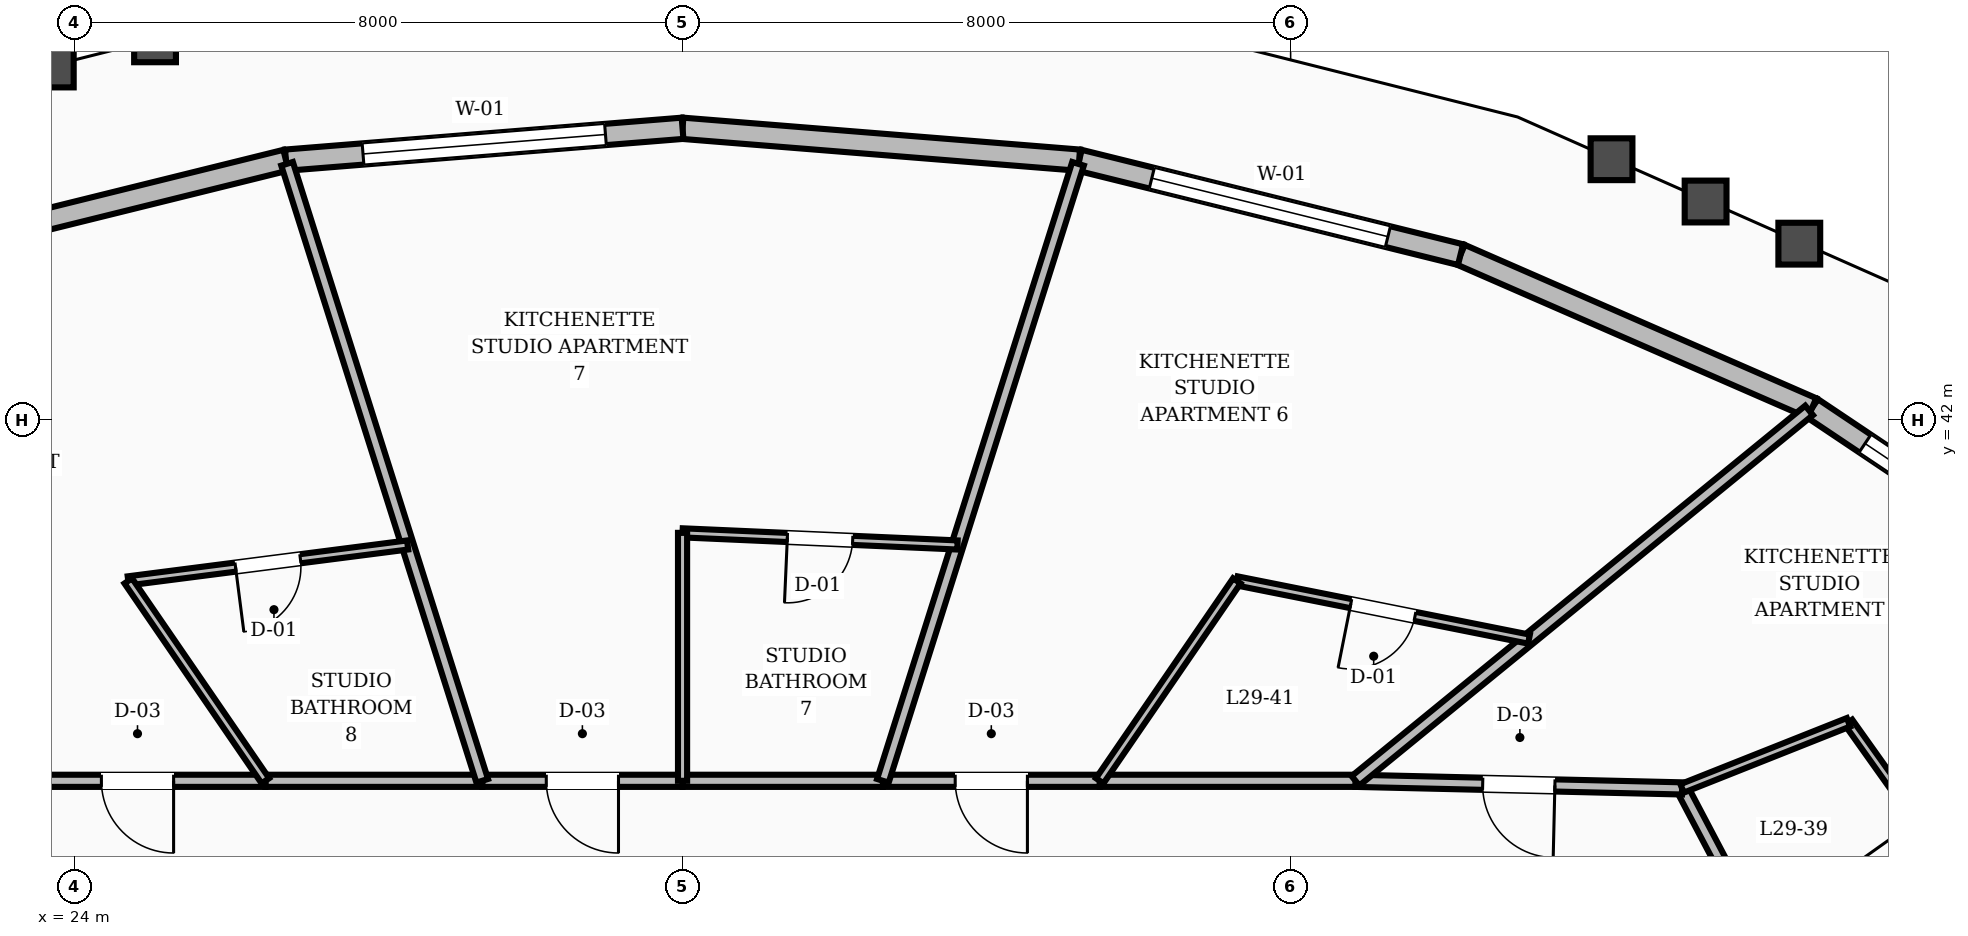
"""IFC4 building model, lengths in metres.
Left out: names, types, materials, properties, quantities, classifications, styles, units other than length and angle.
Written with IfcOpenShell. Run it as: python <this file> out.ifc"""

import sys

from ifc_helpers import new_model, si_unit, direction, frame, frame_2d, origin, place, context, subcontext, project, spatial, rectangle, extrude, element, fill, save


model = new_model("IFC4")
c1 = context("Model", 3, precision=1e-05, world=origin(), true_north=direction((0.0, 1.0)))
c2 = subcontext(c1, "Body", "Model", "MODEL_VIEW")
j1 = project(units=[si_unit("LENGTHUNIT", "METRE"), si_unit("PLANEANGLEUNIT", "RADIAN")], contexts=[c1])
p1 = place(None, origin())
s1 = spatial("IfcSite", under=j1, at=p1, CompositionType="ELEMENT")
p2 = place(p1, origin())
s2 = spatial("IfcBuilding", under=s1, at=p2, CompositionType="ELEMENT")
p3 = place(p2, frame((0.0, 0.0, 117.2)))
s3 = spatial("IfcBuildingStorey", under=s2, at=p3, CompositionType="ELEMENT", Elevation=117.2)
p4 = place(p3, frame((50.913, 39.439, 0.0), z_axis=(0.0, 0.0, 1.0), x_axis=(-0.830785482437, 0.556592743549, 0.0)))
e1 = element("IfcWall", 1, at=p4, inside=s3, PredefinedType="STANDARD", context=c2, shape_type="SweptSolid", body=[
    extrude(rectangle(XDim=4.878, YDim=0.28, at=frame_2d((2.439, 0.0))), origin(), (0.0, 0.0, 1.0), 2.82),
])
p5 = place(p4, frame((0.839, 0.0, 0.8)))
e2 = element("IfcOpeningElement", 2, at=p5, cuts=e1, PredefinedType="OPENING", context=c2, shape_type="SweptSolid", body=[
    extrude(rectangle(XDim=3.2, YDim=1.65, at=frame_2d((1.6, 0.825))), frame((0.0, 0.15, 0.0), z_axis=(0.0, -1.0, 0.0), x_axis=(1.0, 0.0, 0.0)), (0.0, 0.0, 1.0), 0.3),
])
p6 = place(p3, frame((46.86, 42.155, 0.0), z_axis=(0.0, 0.0, 1.0), x_axis=(-0.916542280899, 0.39993780432, 0.0)))
e3 = element("IfcWall", 3, at=p6, inside=s3, PredefinedType="STANDARD", context=c2, shape_type="SweptSolid", body=[
    extrude(rectangle(XDim=5.045, YDim=0.28, at=frame_2d((2.523, 0.0))), origin(), (0.0, 0.0, 1.0), 2.82),
])
p7 = place(p3, frame((42.235, 44.173, 0.0), z_axis=(0.0, 0.0, 1.0), x_axis=(-0.970681867926, 0.24036786657, 0.0)))
e4 = element("IfcWall", 4, at=p7, inside=s3, PredefinedType="STANDARD", context=c2, shape_type="SweptSolid", body=[
    extrude(rectangle(XDim=5.169, YDim=0.28, at=frame_2d((2.584, 0.0))), origin(), (0.0, 0.0, 1.0), 2.82),
])
p8 = place(p7, frame((0.985, 0.0, 0.8)))
e5 = element("IfcOpeningElement", 5, at=p8, cuts=e4, PredefinedType="OPENING", context=c2, shape_type="SweptSolid", body=[
    extrude(rectangle(XDim=3.2, YDim=1.65, at=frame_2d((1.6, 0.825))), frame((0.0, 0.15, 0.0), z_axis=(0.0, -1.0, 0.0), x_axis=(1.0, 0.0, 0.0)), (0.0, 0.0, 1.0), 0.3),
])
p9 = place(p3, frame((37.218, 45.415, 0.0), z_axis=(0.0, 0.0, 1.0), x_axis=(-0.996781229601, 0.080169696986, 0.0)))
e6 = element("IfcWall", 6, at=p9, inside=s3, PredefinedType="STANDARD", context=c2, shape_type="SweptSolid", body=[
    extrude(rectangle(XDim=5.235, YDim=0.28, at=frame_2d((2.617, 0.0))), origin(), (0.0, 0.0, 1.0), 2.82),
])
p10 = place(p3, frame((32.0, 45.835, 0.0), z_axis=(0.0, 0.0, 1.0), x_axis=(-0.996781229601, -0.080169696986, 0.0)))
e7 = element("IfcWall", 7, at=p10, inside=s3, PredefinedType="STANDARD", context=c2, shape_type="SweptSolid", body=[
    extrude(rectangle(XDim=5.235, YDim=0.28, at=frame_2d((2.617, 0.0))), origin(), (0.0, 0.0, 1.0), 2.82),
])
p11 = place(p10, frame((1.017, 0.0, 0.8)))
e8 = element("IfcOpeningElement", 8, at=p11, cuts=e7, PredefinedType="OPENING", context=c2, shape_type="SweptSolid", body=[
    extrude(rectangle(XDim=3.2, YDim=1.65, at=frame_2d((1.6, 0.825))), frame((0.0, 0.15, 0.0), z_axis=(0.0, -1.0, 0.0), x_axis=(1.0, 0.0, 0.0)), (0.0, 0.0, 1.0), 0.3),
])
p12 = place(p3, frame((26.782, 45.415, 0.0), z_axis=(0.0, 0.0, 1.0), x_axis=(-0.970681867926, -0.24036786657, 0.0)))
e9 = element("IfcWall", 9, at=p12, inside=s3, PredefinedType="STANDARD", context=c2, shape_type="SweptSolid", body=[
    extrude(rectangle(XDim=5.169, YDim=0.28, at=frame_2d((2.584, 0.0))), origin(), (0.0, 0.0, 1.0), 2.82),
])
p13 = place(p3, frame((46.85, 33.923, 0.0), z_axis=(0.0, 0.0, 1.0), x_axis=(-0.466093963429, 0.884735224378, 0.0)))
e10 = element("IfcWall", 10, at=p13, inside=s3, PredefinedType="SOLIDWALL", context=c2, shape_type="SweptSolid", body=[
    extrude(rectangle(XDim=3.648, YDim=0.16, at=frame_2d((1.824, 0.0))), origin(), (0.0, 0.0, 1.0), 2.8),
])
p14 = place(p3, frame((45.15, 37.15, 0.0), z_axis=(0.0, 0.0, 1.0), x_axis=(-0.999728709658, 0.023291781507, 0.0)))
e11 = element("IfcWall", 11, at=p14, inside=s3, PredefinedType="SOLIDWALL", context=c2, shape_type="SweptSolid", body=[
    extrude(rectangle(XDim=4.298, YDim=0.16, at=frame_2d((2.149, 0.0))), origin(), (0.0, 0.0, 1.0), 2.8),
])
p15 = place(p14, frame((1.674, 0.0, 0.0)))
e12 = element("IfcOpeningElement", 12, at=p15, cuts=e11, PredefinedType="OPENING", context=c2, shape_type="SweptSolid", body=[
    extrude(rectangle(XDim=0.95, YDim=2.1, at=frame_2d((0.475, 1.05))), frame((0.0, 0.09, 0.0), z_axis=(0.0, -1.0, 0.0), x_axis=(1.0, 0.0, 0.0)), (0.0, 0.0, 1.0), 0.18),
])
p16 = place(p3, frame((40.854, 37.25, 0.0), z_axis=(0.0, 0.0, 1.0), x_axis=(-1.0, 0.0, 0.0)))
e13 = element("IfcWall", 13, at=p16, inside=s3, PredefinedType="SOLIDWALL", context=c2, shape_type="SweptSolid", body=[
    extrude(rectangle(XDim=3.365, YDim=0.16, at=frame_2d((1.683, 0.0))), origin(), (0.0, 0.0, 1.0), 2.8),
])
p17 = place(p3, frame((37.488, 37.25, 0.0), z_axis=(0.0, 0.0, 1.0), x_axis=(-1.0, 0.0, 0.0)))
e14 = element("IfcWall", 14, at=p17, inside=s3, PredefinedType="SOLIDWALL", context=c2, shape_type="SweptSolid", body=[
    extrude(rectangle(XDim=2.853, YDim=0.16, at=frame_2d((1.426, 0.0))), origin(), (0.0, 0.0, 1.0), 2.8),
])
p18 = place(p17, frame((0.951, 0.0, 0.0)))
e15 = element("IfcOpeningElement", 15, at=p18, cuts=e14, PredefinedType="OPENING", context=c2, shape_type="SweptSolid", body=[
    extrude(rectangle(XDim=0.95, YDim=2.1, at=frame_2d((0.475, 1.05))), frame((0.0, 0.09, 0.0), z_axis=(0.0, -1.0, 0.0), x_axis=(1.0, 0.0, 0.0)), (0.0, 0.0, 1.0), 0.18),
])
p19 = place(p3, frame((34.635, 37.25, 0.0), z_axis=(0.0, 0.0, 1.0), x_axis=(-1.0, 0.0, 0.0)))
e16 = element("IfcWall", 16, at=p19, inside=s3, PredefinedType="SOLIDWALL", context=c2, shape_type="SweptSolid", body=[
    extrude(rectangle(XDim=2.635, YDim=0.16, at=frame_2d((1.318, 0.0))), origin(), (0.0, 0.0, 1.0), 2.8),
])
p20 = place(p3, frame((32.0, 37.25, 0.0), z_axis=(0.0, 0.0, 1.0), x_axis=(-1.0, 0.0, 0.0)))
e17 = element("IfcWall", 17, at=p20, inside=s3, PredefinedType="SOLIDWALL", context=c2, shape_type="SweptSolid", body=[
    extrude(rectangle(XDim=2.635, YDim=0.16, at=frame_2d((1.318, 0.0))), origin(), (0.0, 0.0, 1.0), 2.8),
])
p21 = place(p20, frame((0.843, 0.0, 0.0)))
e18 = element("IfcOpeningElement", 18, at=p21, cuts=e17, PredefinedType="OPENING", context=c2, shape_type="SweptSolid", body=[
    extrude(rectangle(XDim=0.95, YDim=2.1, at=frame_2d((0.475, 1.05))), frame((0.0, 0.09, 0.0), z_axis=(0.0, -1.0, 0.0), x_axis=(1.0, 0.0, 0.0)), (0.0, 0.0, 1.0), 0.18),
])
p22 = place(p3, frame((29.365, 37.25, 0.0), z_axis=(0.0, 0.0, 1.0), x_axis=(-1.0, 0.0, 0.0)))
e19 = element("IfcWall", 19, at=p22, inside=s3, PredefinedType="SOLIDWALL", context=c2, shape_type="SweptSolid", body=[
    extrude(rectangle(XDim=2.853, YDim=0.16, at=frame_2d((1.426, 0.0))), origin(), (0.0, 0.0, 1.0), 2.8),
])
p23 = place(p3, frame((26.512, 37.25, 0.0), z_axis=(0.0, 0.0, 1.0), x_axis=(-1.0, 0.0, 0.0)))
e20 = element("IfcWall", 20, at=p23, inside=s3, PredefinedType="SOLIDWALL", context=c2, shape_type="SweptSolid", body=[
    extrude(rectangle(XDim=3.365, YDim=0.16, at=frame_2d((1.683, 0.0))), origin(), (0.0, 0.0, 1.0), 2.8),
])
p24 = place(p23, frame((1.208, 0.0, 0.0)))
e21 = element("IfcOpeningElement", 21, at=p24, cuts=e20, PredefinedType="OPENING", context=c2, shape_type="SweptSolid", body=[
    extrude(rectangle(XDim=0.95, YDim=2.1, at=frame_2d((0.475, 1.05))), frame((0.0, 0.09, 0.0), z_axis=(0.0, -1.0, 0.0), x_axis=(1.0, 0.0, 0.0)), (0.0, 0.0, 1.0), 0.18),
])
p25 = place(p3, frame((49.658, 34.762, 0.0), z_axis=(0.0, 0.0, 1.0), x_axis=(-0.579666154862, 0.814854066019, 0.0)))
e22 = element("IfcWall", 22, at=p25, inside=s3, PredefinedType="PARTITIONING", context=c2, shape_type="SweptSolid", body=[
    extrude(rectangle(XDim=3.999, YDim=0.12, at=frame_2d((1.999, 0.0))), origin(), (0.0, 0.0, 1.0), 2.8),
])
p26 = place(p25, frame((1.569, 0.0, 0.0)))
e23 = element("IfcOpeningElement", 23, at=p26, cuts=e22, PredefinedType="OPENING", context=c2, shape_type="SweptSolid", body=[
    extrude(rectangle(XDim=0.86, YDim=2.1, at=frame_2d((0.43, 1.05))), frame((0.0, 0.07, 0.0), z_axis=(0.0, -1.0, 0.0), x_axis=(1.0, 0.0, 0.0)), (0.0, 0.0, 1.0), 0.14),
])
p27 = place(p3, frame((45.15, 37.15, 0.0), z_axis=(0.0, 0.0, 1.0), x_axis=(0.929331632403, 0.369246146921, 0.0)))
e24 = element("IfcWall", 24, at=p27, inside=s3, PredefinedType="PARTITIONING", context=c2, shape_type="SweptSolid", body=[
    extrude(rectangle(XDim=2.356, YDim=0.12, at=frame_2d((1.178, 0.0))), origin(), (0.0, 0.0, 1.0), 2.8),
])
p28 = place(p3, frame((40.854, 37.25, 0.0), z_axis=(0.0, 0.0, 1.0), x_axis=(0.774531610093, 0.632535204528, 0.0)))
e25 = element("IfcWall", 25, at=p28, inside=s3, PredefinedType="SOLIDWALL", context=c2, shape_type="SweptSolid", body=[
    extrude(rectangle(XDim=7.704, YDim=0.16, at=frame_2d((3.852, 0.0))), origin(), (0.0, 0.0, 1.0), 2.8),
])
p29 = place(p3, frame((43.136, 39.114, 0.0), z_axis=(0.0, 0.0, 1.0), x_axis=(-0.980671612986, 0.195660899218, 0.0)))
e26 = element("IfcWall", 26, at=p29, inside=s3, PredefinedType="PARTITIONING", context=c2, shape_type="SweptSolid", body=[
    extrude(rectangle(XDim=3.919, YDim=0.12, at=frame_2d((1.959, 0.0))), origin(), (0.0, 0.0, 1.0), 2.8),
])
p30 = place(p29, frame((1.53, 0.0, 0.0)))
e27 = element("IfcOpeningElement", 27, at=p30, cuts=e26, PredefinedType="OPENING", context=c2, shape_type="SweptSolid", body=[
    extrude(rectangle(XDim=0.86, YDim=2.1, at=frame_2d((0.43, 1.05))), frame((0.0, 0.07, 0.0), z_axis=(0.0, -1.0, 0.0), x_axis=(1.0, 0.0, 0.0)), (0.0, 0.0, 1.0), 0.14),
])
p31 = place(p3, frame((37.488, 37.25, 0.0), z_axis=(0.0, 0.0, 1.0), x_axis=(0.565550666982, 0.824713552136, 0.0)))
e28 = element("IfcWall", 28, at=p31, inside=s3, PredefinedType="PARTITIONING", context=c2, shape_type="SweptSolid", body=[
    extrude(rectangle(XDim=3.19, YDim=0.12, at=frame_2d((1.595, 0.0))), origin(), (0.0, 0.0, 1.0), 2.8),
])
p32 = place(p3, frame((34.635, 37.25, 0.0), z_axis=(0.0, 0.0, 1.0), x_axis=(0.301556782857, 0.953448219209, 0.0)))
e29 = element("IfcWall", 29, at=p32, inside=s3, PredefinedType="SOLIDWALL", context=c2, shape_type="SweptSolid", body=[
    extrude(rectangle(XDim=8.514, YDim=0.16, at=frame_2d((4.257, 0.0))), origin(), (0.0, 0.0, 1.0), 2.8),
])
p33 = place(p3, frame((35.617, 40.353, 0.0), z_axis=(0.0, 0.0, 1.0), x_axis=(-0.999030024388, 0.044034195473, 0.0)))
e30 = element("IfcWall", 30, at=p33, inside=s3, PredefinedType="PARTITIONING", context=c2, shape_type="SweptSolid", body=[
    extrude(rectangle(XDim=3.62, YDim=0.12, at=frame_2d((1.81, 0.0))), origin(), (0.0, 0.0, 1.0), 2.8),
])
p34 = place(p33, frame((1.38, 0.0, 0.0)))
e31 = element("IfcOpeningElement", 31, at=p34, cuts=e30, PredefinedType="OPENING", context=c2, shape_type="SweptSolid", body=[
    extrude(rectangle(XDim=0.86, YDim=2.1, at=frame_2d((0.43, 1.05))), frame((0.0, 0.07, 0.0), z_axis=(0.0, -1.0, 0.0), x_axis=(1.0, 0.0, 0.0)), (0.0, 0.0, 1.0), 0.14),
])
p35 = place(p3, frame((32.0, 37.25, 0.0), z_axis=(0.0, 0.0, 1.0), x_axis=(0.0, 1.0, 0.0)))
e32 = element("IfcWall", 32, at=p35, inside=s3, PredefinedType="PARTITIONING", context=c2, shape_type="SweptSolid", body=[
    extrude(rectangle(XDim=3.262, YDim=0.12, at=frame_2d((1.631, 0.0))), origin(), (0.0, 0.0, 1.0), 2.8),
])
p36 = place(p3, frame((29.365, 37.25, 0.0), z_axis=(0.0, 0.0, 1.0), x_axis=(-0.301556782857, 0.953448219209, 0.0)))
e33 = element("IfcWall", 33, at=p36, inside=s3, PredefinedType="SOLIDWALL", context=c2, shape_type="SweptSolid", body=[
    extrude(rectangle(XDim=8.514, YDim=0.16, at=frame_2d((4.257, 0.0))), origin(), (0.0, 0.0, 1.0), 2.8),
])
p37 = place(p3, frame((28.383, 40.353, 0.0), z_axis=(0.0, 0.0, 1.0), x_axis=(-0.991848389459, -0.127423594076, 0.0)))
e34 = element("IfcWall", 34, at=p37, inside=s3, PredefinedType="PARTITIONING", context=c2, shape_type="SweptSolid", body=[
    extrude(rectangle(XDim=3.706, YDim=0.12, at=frame_2d((1.853, 0.0))), origin(), (0.0, 0.0, 1.0), 2.8),
])
p38 = place(p37, frame((1.423, 0.0, 0.0)))
e35 = element("IfcOpeningElement", 35, at=p38, cuts=e34, PredefinedType="OPENING", context=c2, shape_type="SweptSolid", body=[
    extrude(rectangle(XDim=0.86, YDim=2.1, at=frame_2d((0.43, 1.05))), frame((0.0, 0.07, 0.0), z_axis=(0.0, -1.0, 0.0), x_axis=(1.0, 0.0, 0.0)), (0.0, 0.0, 1.0), 0.14),
])
p39 = place(p3, frame((26.512, 37.25, 0.0), z_axis=(0.0, 0.0, 1.0), x_axis=(-0.565550666982, 0.824713552136, 0.0)))
e36 = element("IfcWall", 36, at=p39, inside=s3, PredefinedType="PARTITIONING", context=c2, shape_type="SweptSolid", body=[
    extrude(rectangle(XDim=3.19, YDim=0.12, at=frame_2d((1.595, 0.0))), origin(), (0.0, 0.0, 1.0), 2.8),
])
p40 = place(p5, origin())
e37 = element("IfcWindow", 37, at=p40, inside=s3, PartitioningType="SINGLE_PANEL", PredefinedType="WINDOW", context=c2, shape_type="SweptSolid", body=[
    extrude(rectangle(XDim=3.2, YDim=1.65, at=frame_2d((1.6, 0.825))), frame((0.0, 0.03, 0.0), z_axis=(0.0, -1.0, 0.0), x_axis=(1.0, 0.0, 0.0)), (0.0, 0.0, 1.0), 0.06),
])
fill(e2, e37)
p41 = place(p8, origin())
e38 = element("IfcWindow", 38, at=p41, inside=s3, PartitioningType="SINGLE_PANEL", PredefinedType="WINDOW", context=c2, shape_type="SweptSolid", body=[
    extrude(rectangle(XDim=3.2, YDim=1.65, at=frame_2d((1.6, 0.825))), frame((0.0, 0.03, 0.0), z_axis=(0.0, -1.0, 0.0), x_axis=(1.0, 0.0, 0.0)), (0.0, 0.0, 1.0), 0.06),
])
fill(e5, e38)
p42 = place(p11, origin())
e39 = element("IfcWindow", 39, at=p42, inside=s3, PartitioningType="SINGLE_PANEL", PredefinedType="WINDOW", context=c2, shape_type="SweptSolid", body=[
    extrude(rectangle(XDim=3.2, YDim=1.65, at=frame_2d((1.6, 0.825))), frame((0.0, 0.03, 0.0), z_axis=(0.0, -1.0, 0.0), x_axis=(1.0, 0.0, 0.0)), (0.0, 0.0, 1.0), 0.06),
])
fill(e8, e39)
p43 = place(p15, origin())
e40 = element("IfcDoor", 40, at=p43, inside=s3, OperationType="SINGLE_SWING_LEFT", PredefinedType="DOOR", context=c2, shape_type="SweptSolid", body=[
    extrude(rectangle(XDim=0.95, YDim=2.1, at=frame_2d((0.475, 1.05))), frame((0.0, 0.025, 0.0), z_axis=(0.0, -1.0, 0.0), x_axis=(1.0, 0.0, 0.0)), (0.0, 0.0, 1.0), 0.05),
])
fill(e12, e40)
p44 = place(p30, origin())
e41 = element("IfcDoor", 41, at=p44, inside=s3, OperationType="SINGLE_SWING_RIGHT", PredefinedType="DOOR", context=c2, shape_type="SweptSolid", body=[
    extrude(rectangle(XDim=0.86, YDim=2.1, at=frame_2d((0.43, 1.05))), frame((0.0, 0.025, 0.0), z_axis=(0.0, -1.0, 0.0), x_axis=(1.0, 0.0, 0.0)), (0.0, 0.0, 1.0), 0.05),
])
fill(e27, e41)
p45 = place(p18, origin())
e42 = element("IfcDoor", 42, at=p45, inside=s3, OperationType="SINGLE_SWING_LEFT", PredefinedType="DOOR", context=c2, shape_type="SweptSolid", body=[
    extrude(rectangle(XDim=0.95, YDim=2.1, at=frame_2d((0.475, 1.05))), frame((0.0, 0.025, 0.0), z_axis=(0.0, -1.0, 0.0), x_axis=(1.0, 0.0, 0.0)), (0.0, 0.0, 1.0), 0.05),
])
fill(e15, e42)
p46 = place(p34, origin())
e43 = element("IfcDoor", 43, at=p46, inside=s3, OperationType="SINGLE_SWING_RIGHT", PredefinedType="DOOR", context=c2, shape_type="SweptSolid", body=[
    extrude(rectangle(XDim=0.86, YDim=2.1, at=frame_2d((0.43, 1.05))), frame((0.0, 0.025, 0.0), z_axis=(0.0, -1.0, 0.0), x_axis=(1.0, 0.0, 0.0)), (0.0, 0.0, 1.0), 0.05),
])
fill(e31, e43)
p47 = place(p21, origin())
e44 = element("IfcDoor", 44, at=p47, inside=s3, OperationType="SINGLE_SWING_LEFT", PredefinedType="DOOR", context=c2, shape_type="SweptSolid", body=[
    extrude(rectangle(XDim=0.95, YDim=2.1, at=frame_2d((0.475, 1.05))), frame((0.0, 0.025, 0.0), z_axis=(0.0, -1.0, 0.0), x_axis=(1.0, 0.0, 0.0)), (0.0, 0.0, 1.0), 0.05),
])
fill(e18, e44)
p48 = place(p38, origin())
e45 = element("IfcDoor", 45, at=p48, inside=s3, OperationType="SINGLE_SWING_RIGHT", PredefinedType="DOOR", context=c2, shape_type="SweptSolid", body=[
    extrude(rectangle(XDim=0.86, YDim=2.1, at=frame_2d((0.43, 1.05))), frame((0.0, 0.025, 0.0), z_axis=(0.0, -1.0, 0.0), x_axis=(1.0, 0.0, 0.0)), (0.0, 0.0, 1.0), 0.05),
])
fill(e35, e45)
p49 = place(p24, origin())
e46 = element("IfcDoor", 46, at=p49, inside=s3, OperationType="SINGLE_SWING_LEFT", PredefinedType="DOOR", context=c2, shape_type="SweptSolid", body=[
    extrude(rectangle(XDim=0.95, YDim=2.1, at=frame_2d((0.475, 1.05))), frame((0.0, 0.025, 0.0), z_axis=(0.0, -1.0, 0.0), x_axis=(1.0, 0.0, 0.0)), (0.0, 0.0, 1.0), 0.05),
])
fill(e21, e46)
save(model, sys.argv[1])
